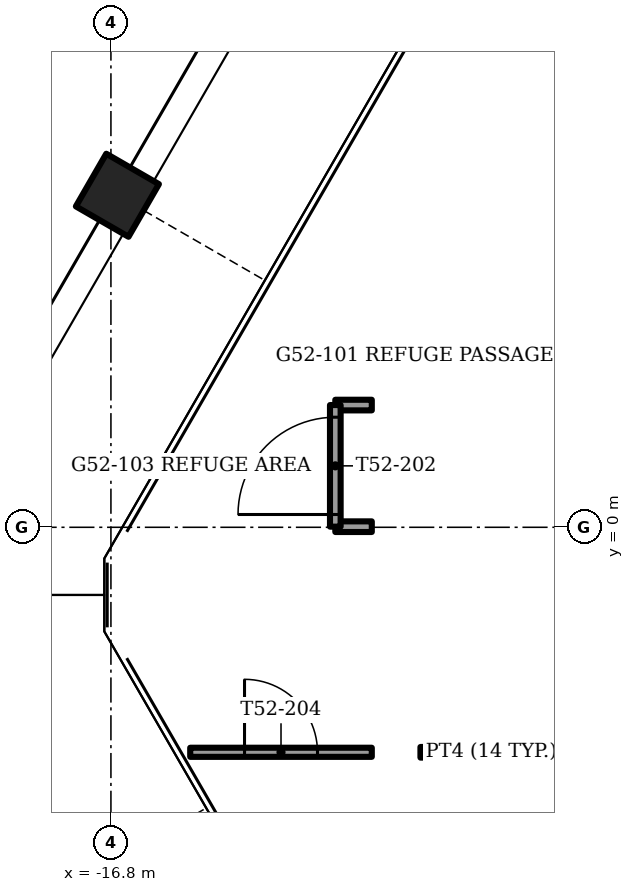
"""IFC4 building model, lengths in metres.
Left out: names, types, materials, properties, quantities, classifications, styles, units other than length and angle.
Written with IfcOpenShell. Run it as: python <this file> out.ifc"""

import sys

from ifc_helpers import new_model, si_unit, direction, frame, frame_2d, origin, origin_2d, place, context, subcontext, project, spatial, rectangle, extrude, element, fill, save


model = new_model("IFC4")
c1 = context("Model", 3, precision=1e-05, world=origin(), true_north=direction((0.0, 1.0)))
c2 = subcontext(c1, "Body", "Model", "MODEL_VIEW")
j1 = project(units=[si_unit("LENGTHUNIT", "METRE"), si_unit("PLANEANGLEUNIT", "RADIAN")], contexts=[c1])
p1 = place(None, origin())
s1 = spatial("IfcSite", under=j1, at=p1, CompositionType="ELEMENT")
p2 = place(p1, origin())
s2 = spatial("IfcBuilding", under=s1, at=p2, CompositionType="ELEMENT")
p3 = place(p2, frame((0.0, 0.0, 209.5)))
s3 = spatial("IfcBuildingStorey", under=s2, at=p3, CompositionType="ELEMENT", Elevation=209.5)
p4 = place(p3, frame((-16.694, 5.46, -1.2), z_axis=(0.0, 0.0, 1.0), x_axis=(0.5, 0.866025403784, 0.0)))
e1 = element("IfcColumn", 1, at=p4, inside=s3, PredefinedType="COLUMN", context=c2, shape_type="SweptSolid", body=[
    extrude(rectangle(XDim=1.0, YDim=1.0, at=origin_2d()), origin(), (0.0, 0.0, 1.0), 5.0),
])
p5 = place(p3, frame((-11.71, -3.7, 0.0), z_axis=(0.0, 0.0, 1.0), x_axis=(1.0, 0.0, 0.0)))
e2 = element("IfcWall", 2, at=p5, inside=s3, PredefinedType="PARTITIONING", context=c2, shape_type="SweptSolid", body=[
    extrude(rectangle(XDim=2.33, YDim=0.175, at=frame_2d((1.165, 0.0))), origin(), (0.0, 0.0, 1.0), 4.7),
])
for number, where, z_axis, x_axis in (
    (3, (-13.11, 0.01, 0.0), (0.0, 0.0, 1.0), (1.0, 0.0, 0.0)),
    (4, (-13.11, 2.01, 0.0), (0.0, 0.0, 1.0), (1.0, 0.0, 0.0)),
):
    element("IfcWall", number, at=place(p3, frame(where, z_axis=z_axis, x_axis=x_axis)), inside=s3, PredefinedType="PARTITIONING", context=c2, shape_type="SweptSolid", body=[
        extrude(rectangle(XDim=0.6, YDim=0.175, at=frame_2d((0.3, 0.0))), origin(), (0.0, 0.0, 1.0), 4.7),
    ])
p6 = place(p3, frame((-13.11, 0.01, 0.0), z_axis=(0.0, 0.0, 1.0), x_axis=(0.0, 1.0, 0.0)))
e5 = element("IfcWall", 5, at=p6, inside=s3, PredefinedType="PARTITIONING", context=c2, shape_type="SweptSolid", body=[
    extrude(rectangle(XDim=2.0, YDim=0.175, at=frame_2d((1.0, 0.0))), origin(), (0.0, 0.0, 1.0), 4.7),
])
p7 = place(p6, frame((0.2, 0.0, 0.0)))
e6 = element("IfcOpeningElement", 6, at=p7, cuts=e5, PredefinedType="OPENING", context=c2, shape_type="SweptSolid", body=[
    extrude(rectangle(XDim=1.6, YDim=2.1, at=frame_2d((0.8, 1.05))), frame((0.0, 0.087, 0.0), z_axis=(0.0, -1.0, 0.0), x_axis=(1.0, 0.0, 0.0)), (0.0, 0.0, 1.0), 0.175),
])
p8 = place(p3, frame((-15.496, -3.7, 0.0), z_axis=(0.0, 0.0, 1.0), x_axis=(1.0, 0.0, 0.0)))
e7 = element("IfcWall", 7, at=p8, inside=s3, PredefinedType="PARTITIONING", context=c2, shape_type="SweptSolid", body=[
    extrude(rectangle(XDim=2.986, YDim=0.15, at=frame_2d((1.493, 0.0))), origin(), (0.0, 0.0, 1.0), 4.7),
])
p9 = place(p8, frame((0.893, 0.0, 0.0)))
e8 = element("IfcOpeningElement", 8, at=p9, cuts=e7, PredefinedType="OPENING", context=c2, shape_type="SweptSolid", body=[
    extrude(rectangle(XDim=1.2, YDim=2.1, at=frame_2d((0.6, 1.05))), frame((0.0, 0.075, 0.0), z_axis=(0.0, -1.0, 0.0), x_axis=(1.0, 0.0, 0.0)), (0.0, 0.0, 1.0), 0.15),
])
p10 = place(p7, origin())
e9 = element("IfcDoor", 9, at=p10, inside=s3, OperationType="DOUBLE_DOOR_SINGLE_SWING", PredefinedType="DOOR", context=c2, shape_type="SweptSolid", body=[
    extrude(rectangle(XDim=1.6, YDim=2.1, at=frame_2d((0.8, 1.05))), frame((0.0, 0.025, 0.0), z_axis=(0.0, -1.0, 0.0), x_axis=(1.0, 0.0, 0.0)), (0.0, 0.0, 1.0), 0.05),
])
fill(e6, e9)
p11 = place(p9, origin())
e10 = element("IfcDoor", 10, at=p11, inside=s3, OperationType="SINGLE_SWING_RIGHT", PredefinedType="DOOR", context=c2, shape_type="SweptSolid", body=[
    extrude(rectangle(XDim=1.2, YDim=2.1, at=frame_2d((0.6, 1.05))), frame((0.0, 0.025, 0.0), z_axis=(0.0, -1.0, 0.0), x_axis=(1.0, 0.0, 0.0)), (0.0, 0.0, 1.0), 0.05),
])
fill(e8, e10)
save(model, sys.argv[1])
